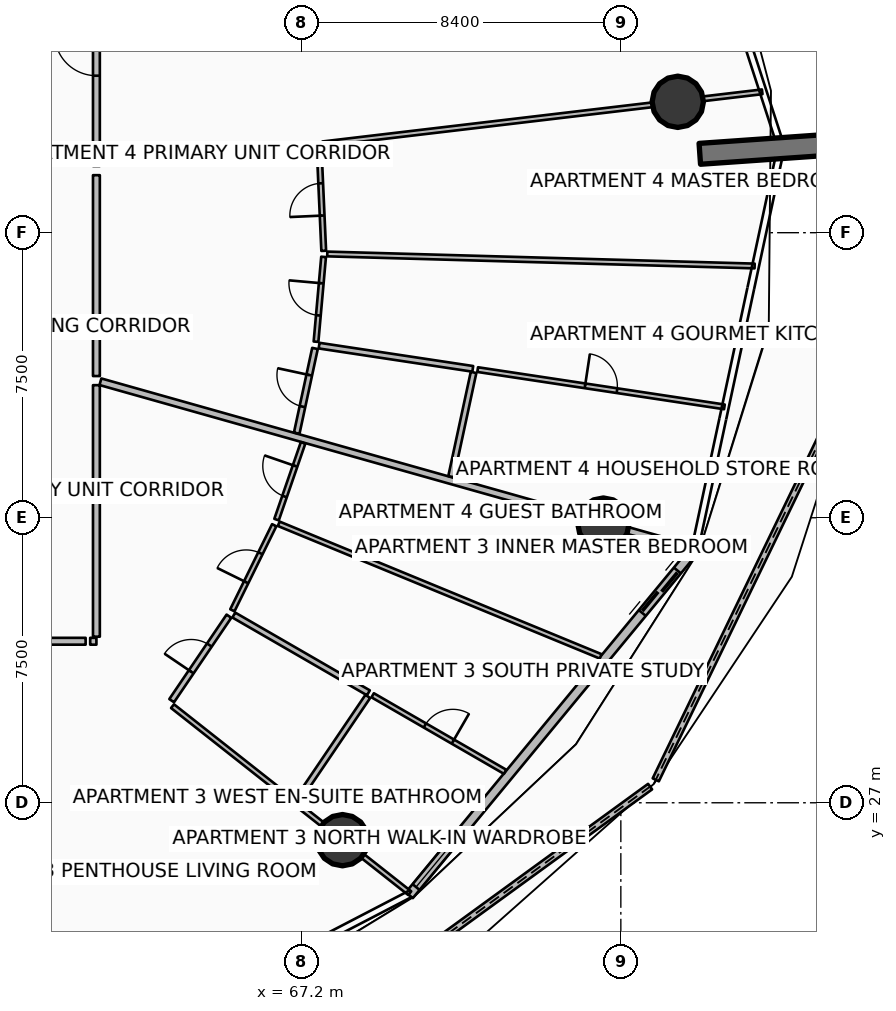
"""IFC4 building model, lengths in metres.
Left out: names, types, materials, properties, quantities, classifications, styles, units other than length and angle.
Written with IfcOpenShell. Run it as: python <this file> out.ifc"""

import sys

from ifc_helpers import new_model, si_unit, direction, frame, frame_2d, origin, origin_2d, place, context, subcontext, project, spatial, polyline, rectangle, circle, outline, extrude, element, fill, save


model = new_model("IFC4")
c1 = context("Model", 3, precision=1e-05, world=origin(), true_north=direction((0.0, 1.0)))
c2 = subcontext(c1, "Body", "Model", "MODEL_VIEW")
j1 = project(units=[si_unit("LENGTHUNIT", "METRE"), si_unit("PLANEANGLEUNIT", "RADIAN")], contexts=[c1])
p1 = place(None, origin())
s1 = spatial("IfcSite", under=j1, at=p1, CompositionType="ELEMENT")
p2 = place(p1, origin())
s2 = spatial("IfcBuilding", under=s1, at=p2, CompositionType="ELEMENT")
p3 = place(p2, frame((0.0, 0.0, 56.4)))
s3 = spatial("IfcBuildingStorey", under=s2, at=p3, CompositionType="ELEMENT", Elevation=56.4)
p4 = place(p3, frame((77.678, 44.075, 0.0), z_axis=(0.0, 0.0, 1.0), x_axis=(0.997564163539, 0.069754853754, 0.0)))
e1 = element("IfcWall", 1, at=p4, inside=s3, PredefinedType="SOLIDWALL", context=c2, shape_type="SweptSolid", body=[
    extrude(rectangle(XDim=3.5, YDim=0.55, at=frame_2d((1.75, 0.0))), origin(), (0.0, 0.0, 1.0), 3.75),
])
for number, where, z_axis, x_axis in (
    (2, (68.276, 26.016, 0.0), (0.0, 0.0, 1.0), (1.0, 0.0, 0.0)),
    (3, (75.141, 34.345, 0.0), (0.0, 0.0, 1.0), (1.0, 0.0, 0.0)),
    (4, (77.098, 45.444, 0.0), (0.0, 0.0, 1.0), (1.0, 0.0, 0.0)),
):
    element("IfcColumn", number, at=place(p3, frame(where, z_axis=z_axis, x_axis=x_axis)), inside=s3, PredefinedType="COLUMN", context=c2, shape_type="SweptSolid", body=[
        extrude(circle(Radius=0.675, at=origin_2d()), origin(), (0.0, 0.0, 1.0), 3.5),
    ])
p5 = place(p3, frame((66.691, 20.385, 0.0), z_axis=(0.0, 0.0, 1.0), x_axis=(0.808711385096, 0.588205657586, 0.0)))
e5 = element("IfcWall", 5, at=p5, inside=s3, PredefinedType="PARAPET", context=c2, shape_type="SweptSolid", body=[
    extrude(outline(polyline([(0.0, 0.0), (11.969, 0.0), (11.969, 1.632), (5.984, 1.418), (0.0, 1.233), (0.0, 0.0)])), frame((0.0, 0.09, 0.0), z_axis=(0.0, -1.0, 0.0), x_axis=(1.0, 0.0, 0.0)), (0.0, 0.0, 1.0), 0.18),
])
p6 = place(p3, frame((76.519, 27.604, 0.0), z_axis=(0.0, 0.0, 1.0), x_axis=(0.435391138538, 0.900241387897, 0.0)))
e6 = element("IfcWall", 6, at=p6, inside=s3, PredefinedType="PARAPET", context=c2, shape_type="SweptSolid", body=[
    extrude(outline(polyline([(0.0, 0.0), (12.779, 0.0), (12.779, 1.86), (6.39, 1.798), (0.0, 1.632), (0.0, 0.0)])), frame((0.0, 0.09, 0.0), z_axis=(0.0, -1.0, 0.0), x_axis=(1.0, 0.0, 0.0)), (0.0, 0.0, 1.0), 0.18),
])
p7 = place(p3, frame((70.033, 24.567, 0.0), z_axis=(0.0, 0.0, 1.0), x_axis=(0.636674332663, 0.771132799281, 0.0)))
e7 = element("IfcWall", 7, at=p7, inside=s3, PredefinedType="SOLIDWALL", context=c2, shape_type="SweptSolid", body=[
    extrude(rectangle(XDim=11.851, YDim=0.24, at=frame_2d((5.926, 0.0))), origin(), (0.0, 0.0, 1.0), 2.45),
])
p8 = place(p7, frame((9.631, 0.0, 0.0)))
e8 = element("IfcOpeningElement", 8, at=p8, cuts=e7, PredefinedType="OPENING", context=c2, shape_type="SweptSolid", body=[
    extrude(rectangle(XDim=1.45, YDim=2.15, at=frame_2d((0.725, 1.075))), frame((0.0, 0.13, 0.0), z_axis=(0.0, -1.0, 0.0), x_axis=(1.0, 0.0, 0.0)), (0.0, 0.0, 1.0), 0.26),
])
p9 = place(p7, frame((0.28, 0.0, 0.65)))
e9 = element("IfcOpeningElement", 9, at=p9, cuts=e7, PredefinedType="OPENING", context=c2, shape_type="SweptSolid", body=[
    extrude(rectangle(XDim=1.6, YDim=1.5, at=frame_2d((0.8, 0.75))), frame((0.0, 0.13, 0.0), z_axis=(0.0, -1.0, 0.0), x_axis=(1.0, 0.0, 0.0)), (0.0, 0.0, 1.0), 0.26),
])
p10 = place(p3, frame((61.906, 38.078, 0.0), z_axis=(0.0, 0.0, 1.0), x_axis=(0.962455862511, -0.271438230022, 0.0)))
e10 = element("IfcWall", 10, at=p10, inside=s3, PredefinedType="PARTITIONING", context=c2, shape_type="SweptSolid", body=[
    extrude(rectangle(XDim=16.126, YDim=0.18, at=frame_2d((8.063, 0.0))), origin(), (0.0, 0.0, 1.0), 2.867),
])
p11 = place(p3, frame((54.14, 31.25, 0.0), z_axis=(0.0, 0.0, 1.0), x_axis=(1.0, 0.0, 0.0)))
e11 = element("IfcWall", 11, at=p11, inside=s3, PredefinedType="PARTITIONING", context=c2, shape_type="SweptSolid", body=[
    extrude(rectangle(XDim=7.376, YDim=0.18, at=frame_2d((3.688, 0.0))), origin(), (0.0, 0.0, 1.0), 2.867),
])
p12 = place(p11, frame((3.138, 0.0, 0.0)))
e12 = element("IfcOpeningElement", 12, at=p12, cuts=e11, PredefinedType="OPENING", context=c2, shape_type="SweptSolid", body=[
    extrude(rectangle(XDim=1.1, YDim=2.1, at=frame_2d((0.55, 1.05))), frame((0.0, 0.1, 0.0), z_axis=(0.0, -1.0, 0.0), x_axis=(1.0, 0.0, 0.0)), (0.0, 0.0, 1.0), 0.2),
])
p13 = place(p3, frame((61.636, 31.25, 0.0), z_axis=(0.0, 0.0, 1.0), x_axis=(1.0, 0.0, 0.0)))
e13 = element("IfcWall", 13, at=p13, inside=s3, PredefinedType="PARTITIONING", context=c2, shape_type="SweptSolid", body=[
    extrude(rectangle(XDim=0.164, YDim=0.18, at=frame_2d((0.082, 0.0))), origin(), (0.0, 0.0, 1.0), 2.867),
])
p14 = place(p3, frame((61.8, 31.37, 0.0), z_axis=(0.0, 0.0, 1.0), x_axis=(0.0, 1.0, 0.0)))
e14 = element("IfcWall", 14, at=p14, inside=s3, PredefinedType="PARTITIONING", context=c2, shape_type="SweptSolid", body=[
    extrude(rectangle(XDim=6.618, YDim=0.18, at=frame_2d((3.309, 0.0))), origin(), (0.0, 0.0, 1.0), 2.867),
])
p15 = place(p3, frame((63.803, 29.542, 0.0), z_axis=(0.0, 0.0, 1.0), x_axis=(0.785316547054, -0.619094436191, 0.0)))
e15 = element("IfcWall", 15, at=p15, inside=s3, PredefinedType="PARTITIONING", context=c2, shape_type="SweptSolid", body=[
    extrude(rectangle(XDim=7.949, YDim=0.125, at=frame_2d((3.975, 0.0))), origin(), (0.0, 0.0, 1.0), 2.867),
])
p16 = place(p3, frame((63.781, 29.687, 0.0), z_axis=(0.0, 0.0, 1.0), x_axis=(0.561145635053, 0.82771708709, 0.0)))
e16 = element("IfcWall", 16, at=p16, inside=s3, PredefinedType="PARTITIONING", context=c2, shape_type="SweptSolid", body=[
    extrude(rectangle(XDim=2.685, YDim=0.15, at=frame_2d((1.343, 0.0))), origin(), (0.0, 0.0, 1.0), 2.867),
])
p17 = place(p16, frame((0.918, 0.0, 0.0)))
e17 = element("IfcOpeningElement", 17, at=p17, cuts=e16, PredefinedType="OPENING", context=c2, shape_type="SweptSolid", body=[
    extrude(rectangle(XDim=0.85, YDim=2.06, at=frame_2d((0.425, 1.03))), frame((0.0, 0.085, 0.0), z_axis=(0.0, -1.0, 0.0), x_axis=(1.0, 0.0, 0.0)), (0.0, 0.0, 1.0), 0.17),
])
p18 = place(p3, frame((67.094, 27.074, 0.0), z_axis=(0.0, 0.0, 1.0), x_axis=(0.561136770773, 0.827723096504, 0.0)))
e18 = element("IfcWall", 18, at=p18, inside=s3, PredefinedType="PARTITIONING", context=c2, shape_type="SweptSolid", body=[
    extrude(rectangle(XDim=3.292, YDim=0.15, at=frame_2d((1.646, 0.0))), origin(), (0.0, 0.0, 1.0), 2.867),
])
p19 = place(p3, frame((65.416, 31.939, 0.0), z_axis=(0.0, 0.0, 1.0), x_axis=(0.865897249189, -0.500221904605, 0.0)))
e19 = element("IfcWall", 19, at=p19, inside=s3, PredefinedType="PARTITIONING", context=c2, shape_type="SweptSolid", body=[
    extrude(rectangle(XDim=4.09, YDim=0.15, at=frame_2d((2.045, 0.0))), origin(), (0.0, 0.0, 1.0), 2.94),
])
p20 = place(p3, frame((69.07, 29.828, 0.0), z_axis=(0.0, 0.0, 1.0), x_axis=(0.865911782311, -0.500196746546, 0.0)))
e20 = element("IfcWall", 20, at=p20, inside=s3, PredefinedType="PARTITIONING", context=c2, shape_type="SweptSolid", body=[
    extrude(rectangle(XDim=4.025, YDim=0.125, at=frame_2d((2.012, 0.0))), origin(), (0.0, 0.0, 1.0), 2.94),
])
p21 = place(p20, frame((1.587, 0.0, 0.0)))
e21 = element("IfcOpeningElement", 21, at=p21, cuts=e20, PredefinedType="OPENING", context=c2, shape_type="SweptSolid", body=[
    extrude(rectangle(XDim=0.85, YDim=2.06, at=frame_2d((0.425, 1.03))), frame((0.0, 0.073, 0.0), z_axis=(0.0, -1.0, 0.0), x_axis=(1.0, 0.0, 0.0)), (0.0, 0.0, 1.0), 0.145),
])
p22 = place(p3, frame((66.598, 34.341, 0.0), z_axis=(0.0, 0.0, 1.0), x_axis=(0.9246609872, -0.380791358556, 0.0)))
e22 = element("IfcWall", 22, at=p22, inside=s3, PredefinedType="PARTITIONING", context=c2, shape_type="SweptSolid", body=[
    extrude(rectangle(XDim=9.161, YDim=0.125, at=frame_2d((4.58, 0.0))), origin(), (0.0, 0.0, 1.0), 2.94),
])
p23 = place(p3, frame((65.377, 32.065, 0.0), z_axis=(0.0, 0.0, 1.0), x_axis=(0.441490145673, 0.897266098364, 0.0)))
e23 = element("IfcWall", 23, at=p23, inside=s3, PredefinedType="PARTITIONING", context=c2, shape_type="SweptSolid", body=[
    extrude(rectangle(XDim=2.495, YDim=0.125, at=frame_2d((1.248, 0.0))), origin(), (0.0, 0.0, 1.0), 2.94),
])
p24 = place(p23, frame((0.823, 0.0, 0.0)))
e24 = element("IfcOpeningElement", 24, at=p24, cuts=e23, PredefinedType="OPENING", context=c2, shape_type="SweptSolid", body=[
    extrude(rectangle(XDim=0.85, YDim=2.06, at=frame_2d((0.425, 1.03))), frame((0.0, 0.073, 0.0), z_axis=(0.0, -1.0, 0.0), x_axis=(1.0, 0.0, 0.0)), (0.0, 0.0, 1.0), 0.145),
])
p25 = place(p3, frame((66.541, 34.451, 0.0), z_axis=(0.0, 0.0, 1.0), x_axis=(0.326627883033, 0.945153017255, 0.0)))
e25 = element("IfcWall", 25, at=p25, inside=s3, PredefinedType="PARTITIONING", context=c2, shape_type="SweptSolid", body=[
    extrude(rectangle(XDim=2.137, YDim=0.125, at=frame_2d((1.068, 0.0))), origin(), (0.0, 0.0, 1.0), 2.867),
])
p26 = place(p25, frame((0.643, 0.0, 0.0)))
e26 = element("IfcOpeningElement", 26, at=p26, cuts=e25, PredefinedType="OPENING", context=c2, shape_type="SweptSolid", body=[
    extrude(rectangle(XDim=0.85, YDim=2.06, at=frame_2d((0.425, 1.03))), frame((0.0, 0.073, 0.0), z_axis=(0.0, -1.0, 0.0), x_axis=(1.0, 0.0, 0.0)), (0.0, 0.0, 1.0), 0.145),
])
p27 = place(p3, frame((61.8, 43.753, 0.0), z_axis=(0.0, 0.0, 1.0), x_axis=(0.0, 1.0, 0.0)))
e27 = element("IfcWall", 27, at=p27, inside=s3, PredefinedType="PARTITIONING", context=c2, shape_type="SweptSolid", body=[
    extrude(rectangle(XDim=5.855, YDim=0.18, at=frame_2d((2.927, 0.0))), origin(), (0.0, 0.0, 1.0), 2.867),
])
p28 = place(p27, frame((2.378, 0.0, 0.0)))
e28 = element("IfcOpeningElement", 28, at=p28, cuts=e27, PredefinedType="OPENING", context=c2, shape_type="SweptSolid", body=[
    extrude(rectangle(XDim=1.1, YDim=2.1, at=frame_2d((0.55, 1.05))), frame((0.0, 0.1, 0.0), z_axis=(0.0, -1.0, 0.0), x_axis=(1.0, 0.0, 0.0)), (0.0, 0.0, 1.0), 0.2),
])
p29 = place(p3, frame((61.8, 38.228, 0.0), z_axis=(0.0, 0.0, 1.0), x_axis=(0.0, 1.0, 0.0)))
e29 = element("IfcWall", 29, at=p29, inside=s3, PredefinedType="PARTITIONING", context=c2, shape_type="SweptSolid", body=[
    extrude(rectangle(XDim=5.285, YDim=0.18, at=frame_2d((2.643, 0.0))), origin(), (0.0, 0.0, 1.0), 2.867),
])
p30 = place(p3, frame((67.755, 44.338, 0.0), z_axis=(0.0, 0.0, 1.0), x_axis=(0.993067500076, 0.117545481801, 0.0)))
e30 = element("IfcWall", 30, at=p30, inside=s3, PredefinedType="PARTITIONING", context=c2, shape_type="SweptSolid", body=[
    extrude(rectangle(XDim=11.646, YDim=0.125, at=frame_2d((5.823, 0.0))), origin(), (0.0, 0.0, 1.0), 2.867),
])
p31 = place(p3, frame((67.071, 36.725, 0.0), z_axis=(0.0, 0.0, 1.0), x_axis=(0.210815805763, 0.977525803261, 0.0)))
e31 = element("IfcWall", 31, at=p31, inside=s3, PredefinedType="PARTITIONING", context=c2, shape_type="SweptSolid", body=[
    extrude(rectangle(XDim=2.28, YDim=0.15, at=frame_2d((1.14, 0.0))), origin(), (0.0, 0.0, 1.0), 2.867),
])
p32 = place(p31, frame((0.715, 0.0, 0.0)))
e32 = element("IfcOpeningElement", 32, at=p32, cuts=e31, PredefinedType="OPENING", context=c2, shape_type="SweptSolid", body=[
    extrude(rectangle(XDim=0.85, YDim=2.06, at=frame_2d((0.425, 1.03))), frame((0.0, 0.085, 0.0), z_axis=(0.0, -1.0, 0.0), x_axis=(1.0, 0.0, 0.0)), (0.0, 0.0, 1.0), 0.17),
])
p33 = place(p3, frame((71.133, 35.58, 0.0), z_axis=(0.0, 0.0, 1.0), x_axis=(0.21084765068, 0.977518934959, 0.0)))
e33 = element("IfcWall", 33, at=p33, inside=s3, PredefinedType="PARTITIONING", context=c2, shape_type="SweptSolid", body=[
    extrude(rectangle(XDim=2.807, YDim=0.15, at=frame_2d((1.403, 0.0))), origin(), (0.0, 0.0, 1.0), 2.867),
])
p34 = place(p3, frame((67.66, 39.029, 0.0), z_axis=(0.0, 0.0, 1.0), x_axis=(0.988765818212, -0.149472929776, 0.0)))
e34 = element("IfcWall", 34, at=p34, inside=s3, PredefinedType="PARTITIONING", context=c2, shape_type="SweptSolid", body=[
    extrude(rectangle(XDim=4.09, YDim=0.15, at=frame_2d((2.045, 0.0))), origin(), (0.0, 0.0, 1.0), 2.94),
])
p35 = place(p3, frame((71.832, 38.398, 0.0), z_axis=(0.0, 0.0, 1.0), x_axis=(0.988773501149, -0.149422098181, 0.0)))
e35 = element("IfcWall", 35, at=p35, inside=s3, PredefinedType="PARTITIONING", context=c2, shape_type="SweptSolid", body=[
    extrude(rectangle(XDim=6.567, YDim=0.125, at=frame_2d((3.283, 0.0))), origin(), (0.0, 0.0, 1.0), 2.94),
])
p36 = place(p35, frame((2.858, 0.0, 0.0)))
e36 = element("IfcOpeningElement", 36, at=p36, cuts=e35, PredefinedType="OPENING", context=c2, shape_type="SweptSolid", body=[
    extrude(rectangle(XDim=0.85, YDim=2.06, at=frame_2d((0.425, 1.03))), frame((0.0, 0.073, 0.0), z_axis=(0.0, -1.0, 0.0), x_axis=(1.0, 0.0, 0.0)), (0.0, 0.0, 1.0), 0.145),
])
p37 = place(p3, frame((67.875, 41.44, 0.0), z_axis=(0.0, 0.0, 1.0), x_axis=(0.999604383534, -0.028126080787, 0.0)))
e37 = element("IfcWall", 37, at=p37, inside=s3, PredefinedType="PARTITIONING", context=c2, shape_type="SweptSolid", body=[
    extrude(rectangle(XDim=11.25, YDim=0.125, at=frame_2d((5.625, 0.0))), origin(), (0.0, 0.0, 1.0), 2.94),
])
p38 = place(p3, frame((67.579, 39.132, 0.0), z_axis=(0.0, 0.0, 1.0), x_axis=(0.089032328007, 0.996028736819, 0.0)))
e38 = element("IfcWall", 38, at=p38, inside=s3, PredefinedType="PARTITIONING", context=c2, shape_type="SweptSolid", body=[
    extrude(rectangle(XDim=2.24, YDim=0.125, at=frame_2d((1.12, 0.0))), origin(), (0.0, 0.0, 1.0), 2.94),
])
p39 = place(p38, frame((0.695, 0.0, 0.0)))
e39 = element("IfcOpeningElement", 39, at=p39, cuts=e38, PredefinedType="OPENING", context=c2, shape_type="SweptSolid", body=[
    extrude(rectangle(XDim=0.85, YDim=2.06, at=frame_2d((0.425, 1.03))), frame((0.0, 0.073, 0.0), z_axis=(0.0, -1.0, 0.0), x_axis=(1.0, 0.0, 0.0)), (0.0, 0.0, 1.0), 0.145),
])
p40 = place(p3, frame((67.781, 41.523, 0.0), z_axis=(0.0, 0.0, 1.0), x_axis=(-0.044740706283, 0.998998633233, 0.0)))
e40 = element("IfcWall", 40, at=p40, inside=s3, PredefinedType="PARTITIONING", context=c2, shape_type="SweptSolid", body=[
    extrude(rectangle(XDim=2.707, YDim=0.125, at=frame_2d((1.353, 0.0))), origin(), (0.0, 0.0, 1.0), 2.867),
])
p41 = place(p40, frame((0.928, 0.0, 0.0)))
e41 = element("IfcOpeningElement", 41, at=p41, cuts=e40, PredefinedType="OPENING", context=c2, shape_type="SweptSolid", body=[
    extrude(rectangle(XDim=0.85, YDim=2.06, at=frame_2d((0.425, 1.03))), frame((0.0, 0.073, 0.0), z_axis=(0.0, -1.0, 0.0), x_axis=(1.0, 0.0, 0.0)), (0.0, 0.0, 1.0), 0.145),
])
p42 = place(p8, origin())
e42 = element("IfcDoor", 42, at=p42, inside=s3, OperationType="DOUBLE_DOOR_SLIDING", PredefinedType="DOOR", context=c2, shape_type="SweptSolid", body=[
    extrude(rectangle(XDim=1.45, YDim=2.15, at=frame_2d((0.725, 1.075))), frame((0.0, 0.025, 0.0), z_axis=(0.0, -1.0, 0.0), x_axis=(1.0, 0.0, 0.0)), (0.0, 0.0, 1.0), 0.05),
])
fill(e8, e42)
p43 = place(p9, origin())
e43 = element("IfcWindow", 43, at=p43, inside=s3, PartitioningType="SINGLE_PANEL", PredefinedType="WINDOW", context=c2, shape_type="SweptSolid", body=[
    extrude(rectangle(XDim=1.6, YDim=1.5, at=frame_2d((0.8, 0.75))), frame((0.0, 0.03, 0.0), z_axis=(0.0, -1.0, 0.0), x_axis=(1.0, 0.0, 0.0)), (0.0, 0.0, 1.0), 0.06),
])
fill(e9, e43)
p44 = place(p17, origin())
e44 = element("IfcDoor", 44, at=p44, inside=s3, OperationType="SINGLE_SWING_LEFT", PredefinedType="DOOR", context=c2, shape_type="SweptSolid", body=[
    extrude(rectangle(XDim=0.85, YDim=2.06, at=frame_2d((0.425, 1.03))), frame((0.0, 0.025, 0.0), z_axis=(0.0, -1.0, 0.0), x_axis=(1.0, 0.0, 0.0)), (0.0, 0.0, 1.0), 0.05),
])
fill(e17, e44)
p45 = place(p21, origin())
e45 = element("IfcDoor", 45, at=p45, inside=s3, OperationType="SINGLE_SWING_RIGHT", PredefinedType="DOOR", context=c2, shape_type="SweptSolid", body=[
    extrude(rectangle(XDim=0.85, YDim=2.06, at=frame_2d((0.425, 1.03))), frame((0.0, 0.025, 0.0), z_axis=(0.0, -1.0, 0.0), x_axis=(1.0, 0.0, 0.0)), (0.0, 0.0, 1.0), 0.05),
])
fill(e21, e45)
p46 = place(p24, origin())
e46 = element("IfcDoor", 46, at=p46, inside=s3, OperationType="SINGLE_SWING_LEFT", PredefinedType="DOOR", context=c2, shape_type="SweptSolid", body=[
    extrude(rectangle(XDim=0.85, YDim=2.06, at=frame_2d((0.425, 1.03))), frame((0.0, 0.025, 0.0), z_axis=(0.0, -1.0, 0.0), x_axis=(1.0, 0.0, 0.0)), (0.0, 0.0, 1.0), 0.05),
])
fill(e24, e46)
p47 = place(p26, origin())
e47 = element("IfcDoor", 47, at=p47, inside=s3, OperationType="SINGLE_SWING_RIGHT", PredefinedType="DOOR", context=c2, shape_type="SweptSolid", body=[
    extrude(rectangle(XDim=0.85, YDim=2.06, at=frame_2d((0.425, 1.03))), frame((0.0, 0.025, 0.0), z_axis=(0.0, -1.0, 0.0), x_axis=(1.0, 0.0, 0.0)), (0.0, 0.0, 1.0), 0.05),
])
fill(e26, e47)
p48 = place(p28, origin())
e48 = element("IfcDoor", 48, at=p48, inside=s3, OperationType="SINGLE_SWING_RIGHT", PredefinedType="DOOR", context=c2, shape_type="SweptSolid", body=[
    extrude(rectangle(XDim=1.1, YDim=2.1, at=frame_2d((0.55, 1.05))), frame((0.0, 0.025, 0.0), z_axis=(0.0, -1.0, 0.0), x_axis=(1.0, 0.0, 0.0)), (0.0, 0.0, 1.0), 0.05),
])
fill(e28, e48)
p49 = place(p32, origin())
e49 = element("IfcDoor", 49, at=p49, inside=s3, OperationType="SINGLE_SWING_RIGHT", PredefinedType="DOOR", context=c2, shape_type="SweptSolid", body=[
    extrude(rectangle(XDim=0.85, YDim=2.06, at=frame_2d((0.425, 1.03))), frame((0.0, 0.025, 0.0), z_axis=(0.0, -1.0, 0.0), x_axis=(1.0, 0.0, 0.0)), (0.0, 0.0, 1.0), 0.05),
])
fill(e32, e49)
p50 = place(p36, origin())
e50 = element("IfcDoor", 50, at=p50, inside=s3, OperationType="SINGLE_SWING_LEFT", PredefinedType="DOOR", context=c2, shape_type="SweptSolid", body=[
    extrude(rectangle(XDim=0.85, YDim=2.06, at=frame_2d((0.425, 1.03))), frame((0.0, 0.025, 0.0), z_axis=(0.0, -1.0, 0.0), x_axis=(1.0, 0.0, 0.0)), (0.0, 0.0, 1.0), 0.05),
])
fill(e36, e50)
p51 = place(p39, origin())
e51 = element("IfcDoor", 51, at=p51, inside=s3, OperationType="SINGLE_SWING_RIGHT", PredefinedType="DOOR", context=c2, shape_type="SweptSolid", body=[
    extrude(rectangle(XDim=0.85, YDim=2.06, at=frame_2d((0.425, 1.03))), frame((0.0, 0.025, 0.0), z_axis=(0.0, -1.0, 0.0), x_axis=(1.0, 0.0, 0.0)), (0.0, 0.0, 1.0), 0.05),
])
fill(e39, e51)
p52 = place(p41, origin())
e52 = element("IfcDoor", 52, at=p52, inside=s3, OperationType="SINGLE_SWING_LEFT", PredefinedType="DOOR", context=c2, shape_type="SweptSolid", body=[
    extrude(rectangle(XDim=0.85, YDim=2.06, at=frame_2d((0.425, 1.03))), frame((0.0, 0.025, 0.0), z_axis=(0.0, -1.0, 0.0), x_axis=(1.0, 0.0, 0.0)), (0.0, 0.0, 1.0), 0.05),
])
fill(e41, e52)
save(model, sys.argv[1])
